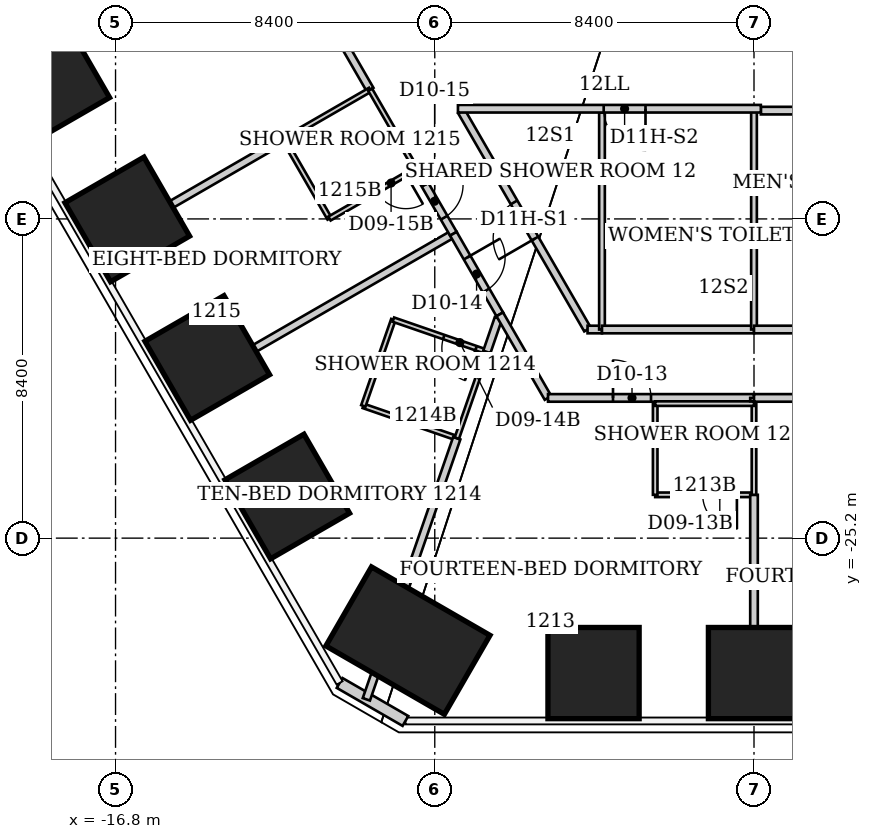
"""IFC4 building model, lengths in metres.
Left out: names, types, materials, properties, quantities, classifications, styles, units other than length and angle.
Written with IfcOpenShell. Run it as: python <this file> out.ifc"""

import sys

from ifc_helpers import new_model, si_unit, direction, frame, frame_2d, origin, origin_2d, place, context, subcontext, project, spatial, rectangle, extrude, clip, halfspace, element, fill, save


model = new_model("IFC4")
c1 = context("Model", 3, precision=1e-05, world=origin(), true_north=direction((0.0, 1.0)))
c2 = subcontext(c1, "Body", "Model", "MODEL_VIEW")
j1 = project(units=[si_unit("LENGTHUNIT", "METRE"), si_unit("PLANEANGLEUNIT", "RADIAN")], contexts=[c1])
p1 = place(None, origin())
s1 = spatial("IfcSite", under=j1, at=p1, CompositionType="ELEMENT")
p2 = place(p1, origin())
s2 = spatial("IfcBuilding", under=s1, at=p2, CompositionType="ELEMENT")
p3 = place(p2, frame((0.0, 0.0, 53.4)))
s3 = spatial("IfcBuildingStorey", under=s2, at=p3, CompositionType="ELEMENT", Elevation=53.4)
p4 = place(p3, frame((0.0, -28.751, 0.0), z_axis=(0.0, 0.0, 1.0), x_axis=(0.0, -1.0, 0.0)))
e1 = element("IfcColumn", 1, at=p4, inside=s3, PredefinedType="COLUMN", context=c2, shape_type="SweptSolid", body=[
    clip(extrude(rectangle(XDim=2.4, YDim=2.4, at=origin_2d()), origin(), (0.0, 0.0, 1.0), 3.745), halfspace(frame((0.0, 0.0, 3.64)), False)),
])
p5 = place(p3, frame((-4.222, -28.751, 0.0), z_axis=(0.0, 0.0, 1.0), x_axis=(0.0, -1.0, 0.0)))
e2 = element("IfcColumn", 2, at=p5, inside=s3, PredefinedType="COLUMN", context=c2, shape_type="SweptSolid", body=[
    clip(extrude(rectangle(XDim=2.4, YDim=2.4, at=origin_2d()), origin(), (0.0, 0.0, 1.0), 3.737), halfspace(frame((0.0, 0.0, 3.64)), False)),
])
p6 = place(p3, frame((-9.106, -27.897, 0.0), z_axis=(0.0, 0.0, 1.0), x_axis=(-0.5, -0.866025403784, 0.0)))
e3 = element("IfcColumn", 3, at=p6, inside=s3, PredefinedType="COLUMN", context=c2, shape_type="SweptSolid", body=[
    clip(extrude(rectangle(XDim=2.4, YDim=3.6, at=origin_2d()), origin(), (0.0, 0.0, 1.0), 3.726), halfspace(frame((0.0, 0.0, 3.64)), False)),
])
p7 = place(p3, frame((-12.282, -24.105, 0.0), z_axis=(0.0, 0.0, 1.0), x_axis=(-0.866025403784, -0.5, 0.0)))
e4 = element("IfcColumn", 4, at=p7, inside=s3, PredefinedType="COLUMN", context=c2, shape_type="SweptSolid", body=[
    clip(extrude(rectangle(XDim=2.4, YDim=2.4, at=origin_2d()), origin(), (0.0, 0.0, 1.0), 3.728), halfspace(frame((0.0, 0.0, 3.64)), False)),
])
p8 = place(p3, frame((-14.387, -20.459, 0.0), z_axis=(0.0, 0.0, 1.0), x_axis=(-0.866025403784, -0.5, 0.0)))
e5 = element("IfcColumn", 5, at=p8, inside=s3, PredefinedType="COLUMN", context=c2, shape_type="SweptSolid", body=[
    clip(extrude(rectangle(XDim=2.4, YDim=2.4, at=origin_2d()), origin(), (0.0, 0.0, 1.0), 3.736), halfspace(frame((0.0, 0.0, 3.64)), False)),
])
p9 = place(p3, frame((-16.491, -16.813, 0.0), z_axis=(0.0, 0.0, 1.0), x_axis=(-0.866025403784, -0.5, 0.0)))
e6 = element("IfcColumn", 6, at=p9, inside=s3, PredefinedType="COLUMN", context=c2, shape_type="SweptSolid", body=[
    clip(extrude(rectangle(XDim=2.4, YDim=2.4, at=origin_2d()), origin(), (0.0, 0.0, 1.0), 3.744), halfspace(frame((0.0, 0.0, 3.64)), False)),
])
p10 = place(p3, frame((-18.596, -13.167, 0.0), z_axis=(0.0, 0.0, 1.0), x_axis=(-0.866025403784, -0.5, 0.0)))
e7 = element("IfcColumn", 7, at=p10, inside=s3, PredefinedType="COLUMN", context=c2, shape_type="SweptSolid", body=[
    clip(extrude(rectangle(XDim=2.4, YDim=2.4, at=origin_2d()), origin(), (0.0, 0.0, 1.0), 3.752), halfspace(frame((0.0, 0.0, 3.64)), False)),
])
p11 = place(p3, frame((-9.172, -30.011, 0.0), z_axis=(0.0, 0.0, 1.0), x_axis=(-0.866010750942, 0.50002537861, 0.0)))
e8 = element("IfcWall", 8, at=p11, inside=s3, PredefinedType="SOLIDWALL", context=c2, shape_type="SweptSolid", body=[
    extrude(rectangle(XDim=2.0, YDim=0.3, at=frame_2d((1.0, 0.0))), origin(), (0.0, 0.0, 1.0), 3.64),
])
p12 = place(p3, frame((-17.356, -17.59, 0.0), z_axis=(0.0, 0.0, 1.0), x_axis=(0.865929957466, 0.500165281445, 0.0)))
e9 = element("IfcWall", 9, at=p12, inside=s3, PredefinedType="PARTITIONING", context=c2, shape_type="SweptSolid", body=[
    extrude(rectangle(XDim=5.758, YDim=0.2, at=frame_2d((2.879, 0.0))), origin(), (0.0, 0.0, 1.0), 3.64),
])
p13 = place(p3, frame((-15.176, -21.38, 0.0), z_axis=(0.0, 0.0, 1.0), x_axis=(0.866276837306, 0.49956425127, 0.0)))
e10 = element("IfcWall", 10, at=p13, inside=s3, PredefinedType="PARTITIONING", context=c2, shape_type="SweptSolid", body=[
    extrude(rectangle(XDim=8.373, YDim=0.2, at=frame_2d((4.186, 0.0))), origin(), (0.0, 0.0, 1.0), 3.64),
])
p14 = place(p3, frame((-13.25, -7.95, 0.0), z_axis=(0.0, 0.0, 1.0), x_axis=(0.500447534468, -0.865766865412, 0.0)))
e11 = element("IfcWall", 11, at=p14, inside=s3, PredefinedType="PARTITIONING", context=c2, shape_type="SweptSolid", body=[
    extrude(rectangle(XDim=6.295, YDim=0.2, at=frame_2d((3.147, 0.0))), origin(), (0.0, 0.0, 1.0), 3.64),
])
p15 = place(p14, frame((2.647, 0.0, 0.0)))
e12 = element("IfcOpeningElement", 12, at=p15, cuts=e11, PredefinedType="OPENING", context=c2, shape_type="SweptSolid", body=[
    extrude(rectangle(XDim=1.0, YDim=2.13, at=frame_2d((0.5, 1.065))), frame((0.0, 0.1, 0.0), z_axis=(0.0, -1.0, 0.0), x_axis=(1.0, 0.0, 0.0)), (0.0, 0.0, 1.0), 0.2),
])
p16 = place(p3, frame((-12.37, -14.71, 0.0), z_axis=(0.0, 0.0, 1.0), x_axis=(0.499769390944, -0.866158505053, 0.0)))
e13 = element("IfcWall", 13, at=p16, inside=s3, PredefinedType="PARTITIONING", context=c2, shape_type="SweptSolid", body=[
    extrude(rectangle(XDim=2.402, YDim=0.12, at=frame_2d((1.201, 0.0))), origin(), (0.0, 0.0, 1.0), 3.64),
])
p17 = place(p3, frame((-12.37, -14.71, 0.0), z_axis=(0.0, 0.0, 1.0), x_axis=(0.866114241029, 0.499846097802, 0.0)))
e14 = element("IfcWall", 14, at=p17, inside=s3, PredefinedType="PARTITIONING", context=c2, shape_type="SweptSolid", body=[
    extrude(rectangle(XDim=2.621, YDim=0.12, at=frame_2d((1.311, 0.0))), origin(), (0.0, 0.0, 1.0), 3.64),
])
p18 = place(p3, frame((-11.17, -16.79, 0.0), z_axis=(0.0, 0.0, 1.0), x_axis=(0.866114241029, 0.499846097802, 0.0)))
e15 = element("IfcWall", 15, at=p18, inside=s3, PredefinedType="PARTITIONING", context=c2, shape_type="SweptSolid", body=[
    extrude(rectangle(XDim=2.621, YDim=0.12, at=frame_2d((1.311, 0.0))), origin(), (0.0, 0.0, 1.0), 3.64),
])
p19 = place(p18, frame((1.421, 0.0, 0.0)))
e16 = element("IfcOpeningElement", 16, at=p19, cuts=e15, PredefinedType="OPENING", context=c2, shape_type="SweptSolid", body=[
    extrude(rectangle(XDim=0.9, YDim=2.03, at=frame_2d((0.45, 1.015))), frame((0.0, 0.06, 0.0), z_axis=(0.0, -1.0, 0.0), x_axis=(1.0, 0.0, 0.0)), (0.0, 0.0, 1.0), 0.12),
])
p20 = place(p3, frame((-10.28, -21.72, 0.0), z_axis=(0.0, 0.0, 1.0), x_axis=(0.94515546045, -0.326620813149, 0.0)))
e17 = element("IfcWall", 17, at=p20, inside=s3, PredefinedType="PARTITIONING", context=c2, shape_type="SweptSolid", body=[
    extrude(rectangle(XDim=2.603, YDim=0.12, at=frame_2d((1.301, 0.0))), origin(), (0.0, 0.0, 1.0), 3.64),
])
p21 = place(p3, frame((-10.2, -29.442, 0.0), z_axis=(0.0, 0.0, 1.0), x_axis=(0.327154379454, 0.944970905374, 0.0)))
e18 = element("IfcWall", 18, at=p21, inside=s3, PredefinedType="PARTITIONING", context=c2, shape_type="SweptSolid", body=[
    extrude(rectangle(XDim=7.272, YDim=0.2, at=frame_2d((3.636, 0.0))), origin(), (0.0, 0.0, 1.0), 3.64),
])
p22 = place(p3, frame((-10.1, -13.4, 0.0), z_axis=(0.0, 0.0, 1.0), x_axis=(0.499769390944, -0.866158505053, 0.0)))
e19 = element("IfcWall", 19, at=p22, inside=s3, PredefinedType="PARTITIONING", context=c2, shape_type="SweptSolid", body=[
    extrude(rectangle(XDim=2.402, YDim=0.12, at=frame_2d((1.201, 0.0))), origin(), (0.0, 0.0, 1.0), 3.64),
])
p23 = place(p3, frame((-9.49, -19.45, 0.0), z_axis=(0.0, 0.0, 1.0), x_axis=(-0.328693963496, -0.944436487203, 0.0)))
e20 = element("IfcWall", 20, at=p23, inside=s3, PredefinedType="PARTITIONING", context=c2, shape_type="SweptSolid", body=[
    extrude(rectangle(XDim=2.404, YDim=0.12, at=frame_2d((1.202, 0.0))), origin(), (0.0, 0.0, 1.0), 3.64),
])
p24 = place(p3, frame((-8.9, -15.48, 0.0), z_axis=(0.0, 0.0, 1.0), x_axis=(0.501041141208, -0.865423465603, 0.0)))
e21 = element("IfcWall", 21, at=p24, inside=s3, PredefinedType="PARTITIONING", context=c2, shape_type="SweptSolid", body=[
    extrude(rectangle(XDim=1.976, YDim=0.2, at=frame_2d((0.988, 0.0))), origin(), (0.0, 0.0, 1.0), 3.64),
])
p25 = place(p24, frame((0.488, 0.0, 0.0)))
e22 = element("IfcOpeningElement", 22, at=p25, cuts=e21, PredefinedType="OPENING", context=c2, shape_type="SweptSolid", body=[
    extrude(rectangle(XDim=1.0, YDim=2.13, at=frame_2d((0.5, 1.065))), frame((0.0, 0.1, 0.0), z_axis=(0.0, -1.0, 0.0), x_axis=(1.0, 0.0, 0.0)), (0.0, 0.0, 1.0), 0.2),
])
p26 = place(p3, frame((-7.91, -17.19, 0.0), z_axis=(0.0, 0.0, 1.0), x_axis=(0.498748634132, -0.866746675766, 0.0)))
e23 = element("IfcWall", 23, at=p26, inside=s3, PredefinedType="PARTITIONING", context=c2, shape_type="SweptSolid", body=[
    extrude(rectangle(XDim=2.446, YDim=0.2, at=frame_2d((1.223, 0.0))), origin(), (0.0, 0.0, 1.0), 3.64),
])
p27 = place(p26, frame((0.723, 0.0, 0.0)))
e24 = element("IfcOpeningElement", 24, at=p27, cuts=e23, PredefinedType="OPENING", context=c2, shape_type="SweptSolid", body=[
    extrude(rectangle(XDim=1.0, YDim=2.13, at=frame_2d((0.5, 1.065))), frame((0.0, 0.1, 0.0), z_axis=(0.0, -1.0, 0.0), x_axis=(1.0, 0.0, 0.0)), (0.0, 0.0, 1.0), 0.2),
])
p28 = place(p3, frame((-7.82, -22.57, 0.0), z_axis=(0.0, 0.0, 1.0), x_axis=(0.328693963496, 0.944436487203, 0.0)))
e25 = element("IfcWall", 25, at=p28, inside=s3, PredefinedType="PARTITIONING", context=c2, shape_type="SweptSolid", body=[
    extrude(rectangle(XDim=2.404, YDim=0.12, at=frame_2d((1.202, 0.0))), origin(), (0.0, 0.0, 1.0), 3.64),
])
p29 = place(p3, frame((-7.03, -20.3, 0.0), z_axis=(0.0, 0.0, 1.0), x_axis=(-0.94515546045, 0.326620813149, 0.0)))
e26 = element("IfcWall", 26, at=p29, inside=s3, PredefinedType="PARTITIONING", context=c2, shape_type="SweptSolid", body=[
    extrude(rectangle(XDim=2.603, YDim=0.12, at=frame_2d((1.301, 0.0))), origin(), (0.0, 0.0, 1.0), 3.64),
])
p30 = place(p29, frame((0.3, 0.0, 0.0)))
e27 = element("IfcOpeningElement", 27, at=p30, cuts=e26, PredefinedType="OPENING", context=c2, shape_type="SweptSolid", body=[
    extrude(rectangle(XDim=0.9, YDim=2.03, at=frame_2d((0.45, 1.015))), frame((0.0, 0.06, 0.0), z_axis=(0.0, -1.0, 0.0), x_axis=(1.0, 0.0, 0.0)), (0.0, 0.0, 1.0), 0.12),
])
p31 = place(p3, frame((-7.03, -20.3, 0.0), z_axis=(0.0, 0.0, 1.0), x_axis=(0.324737408014, 0.94580421644, 0.0)))
e28 = element("IfcWall", 28, at=p31, inside=s3, PredefinedType="PARTITIONING", context=c2, shape_type="SweptSolid", body=[
    extrude(rectangle(XDim=0.937, YDim=0.2, at=frame_2d((0.468, 0.0))), origin(), (0.0, 0.0, 1.0), 3.64),
])
p32 = place(p3, frame((-6.69, -19.31, 0.0), z_axis=(0.0, 0.0, 1.0), x_axis=(0.499963722229, -0.866046347752, 0.0)))
e29 = element("IfcWall", 29, at=p32, inside=s3, PredefinedType="PARTITIONING", context=c2, shape_type="SweptSolid", body=[
    extrude(rectangle(XDim=2.54, YDim=0.2, at=frame_2d((1.27, 0.0))), origin(), (0.0, 0.0, 1.0), 3.64),
])
p33 = place(p3, frame((-5.42, -21.51, 0.0), z_axis=(0.0, 0.0, 1.0), x_axis=(1.0, 0.0, 0.0)))
e30 = element("IfcWall", 30, at=p33, inside=s3, PredefinedType="PARTITIONING", context=c2, shape_type="SweptSolid", body=[
    extrude(rectangle(XDim=5.42, YDim=0.2, at=frame_2d((2.71, 0.0))), origin(), (0.0, 0.0, 1.0), 3.64),
])
p34 = place(p33, frame((1.71, 0.0, 0.0)))
e31 = element("IfcOpeningElement", 31, at=p34, cuts=e30, PredefinedType="OPENING", context=c2, shape_type="SweptSolid", body=[
    extrude(rectangle(XDim=1.0, YDim=2.13, at=frame_2d((0.5, 1.065))), frame((0.0, 0.1, 0.0), z_axis=(0.0, -1.0, 0.0), x_axis=(1.0, 0.0, 0.0)), (0.0, 0.0, 1.0), 0.2),
])
p35 = place(p3, frame((-4.38, -19.71, 0.0), z_axis=(0.0, 0.0, 1.0), x_axis=(-0.500523653757, 0.865722860984, 0.0)))
e32 = element("IfcWall", 32, at=p35, inside=s3, PredefinedType="PARTITIONING", context=c2, shape_type="SweptSolid", body=[
    extrude(rectangle(XDim=6.628, YDim=0.2, at=frame_2d((3.314, 0.0))), origin(), (0.0, 0.0, 1.0), 3.64),
])
p36 = place(p35, frame((2.764, 0.0, 0.0)))
e33 = element("IfcOpeningElement", 33, at=p36, cuts=e32, PredefinedType="OPENING", context=c2, shape_type="SweptSolid", body=[
    extrude(rectangle(XDim=1.1, YDim=2.2, at=frame_2d((0.55, 1.1))), frame((0.0, 0.1, 0.0), z_axis=(0.0, -1.0, 0.0), x_axis=(1.0, 0.0, 0.0)), (0.0, 0.0, 1.0), 0.2),
])
p37 = place(p3, frame((-4.0, -19.71, 0.0), z_axis=(0.0, 0.0, 1.0), x_axis=(-1.0, 0.0, 0.0)))
e34 = element("IfcWall", 34, at=p37, inside=s3, PredefinedType="PARTITIONING", context=c2, shape_type="SweptSolid", body=[
    extrude(rectangle(XDim=0.38, YDim=0.2, at=frame_2d((0.19, 0.0))), origin(), (0.0, 0.0, 1.0), 3.64),
])
p38 = place(p3, frame((-4.0, -14.0, 0.0), z_axis=(0.0, 0.0, 1.0), x_axis=(0.0, -1.0, 0.0)))
e35 = element("IfcWall", 35, at=p38, inside=s3, PredefinedType="PARTITIONING", context=c2, shape_type="SweptSolid", body=[
    extrude(rectangle(XDim=5.71, YDim=0.15, at=frame_2d((2.855, 0.0))), origin(), (0.0, 0.0, 1.0), 3.64),
])
p39 = place(p3, frame((-2.6, -24.06, 0.0), z_axis=(0.0, 0.0, 1.0), x_axis=(1.0, 0.0, 0.0)))
e36 = element("IfcWall", 36, at=p39, inside=s3, PredefinedType="PARTITIONING", context=c2, shape_type="SweptSolid", body=[
    extrude(rectangle(XDim=2.6, YDim=0.12, at=frame_2d((1.3, 0.0))), origin(), (0.0, 0.0, 1.0), 3.64),
])
p40 = place(p39, frame((1.25, 0.0, 0.0)))
e37 = element("IfcOpeningElement", 37, at=p40, cuts=e36, PredefinedType="OPENING", context=c2, shape_type="SweptSolid", body=[
    extrude(rectangle(XDim=0.9, YDim=2.03, at=frame_2d((0.45, 1.015))), frame((0.0, 0.06, 0.0), z_axis=(0.0, -1.0, 0.0), x_axis=(1.0, 0.0, 0.0)), (0.0, 0.0, 1.0), 0.12),
])
p41 = place(p3, frame((-2.6, -21.66, 0.0), z_axis=(0.0, 0.0, 1.0), x_axis=(0.0, -1.0, 0.0)))
e38 = element("IfcWall", 38, at=p41, inside=s3, PredefinedType="PARTITIONING", context=c2, shape_type="SweptSolid", body=[
    extrude(rectangle(XDim=2.4, YDim=0.12, at=frame_2d((1.2, 0.0))), origin(), (0.0, 0.0, 1.0), 3.64),
])
p42 = place(p3, frame((0.0, -29.89, 0.0), z_axis=(0.0, 0.0, 1.0), x_axis=(0.0, 1.0, 0.0)))
e39 = element("IfcWall", 39, at=p42, inside=s3, PredefinedType="PARTITIONING", context=c2, shape_type="SweptSolid", body=[
    extrude(rectangle(XDim=5.83, YDim=0.2, at=frame_2d((2.915, 0.0))), origin(), (0.0, 0.0, 1.0), 2.86),
])
p43 = place(p3, frame((0.0, -24.06, 0.0), z_axis=(0.0, 0.0, 1.0), x_axis=(0.0, 1.0, 0.0)))
e40 = element("IfcWall", 40, at=p43, inside=s3, PredefinedType="PARTITIONING", context=c2, shape_type="SweptSolid", body=[
    extrude(rectangle(XDim=2.4, YDim=0.12, at=frame_2d((1.2, 0.0))), origin(), (0.0, 0.0, 1.0), 2.86),
])
p44 = place(p3, frame((0.0, -21.66, 0.0), z_axis=(0.0, 0.0, 1.0), x_axis=(-1.0, 0.0, 0.0)))
e41 = element("IfcWall", 41, at=p44, inside=s3, PredefinedType="PARTITIONING", context=c2, shape_type="SweptSolid", body=[
    extrude(rectangle(XDim=2.6, YDim=0.12, at=frame_2d((1.3, 0.0))), origin(), (0.0, 0.0, 1.0), 3.64),
])
p45 = place(p3, frame((0.0, -21.6, 0.0), z_axis=(0.0, 0.0, 1.0), x_axis=(0.0, 1.0, 0.0)))
e42 = element("IfcWall", 42, at=p45, inside=s3, PredefinedType="PARTITIONING", context=c2, shape_type="SweptSolid", body=[
    extrude(rectangle(XDim=0.09, YDim=0.2, at=frame_2d((0.045, 0.0))), origin(), (0.0, 0.0, 1.0), 3.64),
])
p46 = place(p3, frame((0.0, -21.51, 0.0), z_axis=(0.0, 0.0, 1.0), x_axis=(1.0, 0.0, 0.0)))
e43 = element("IfcWall", 43, at=p46, inside=s3, PredefinedType="PARTITIONING", context=c2, shape_type="SweptSolid", body=[
    extrude(rectangle(XDim=5.42, YDim=0.2, at=frame_2d((2.71, 0.0))), origin(), (0.0, 0.0, 1.0), 3.64),
])
p47 = place(p46, frame((2.21, 0.0, 0.0)))
e44 = element("IfcOpeningElement", 44, at=p47, cuts=e43, PredefinedType="OPENING", context=c2, shape_type="SweptSolid", body=[
    extrude(rectangle(XDim=1.0, YDim=2.13, at=frame_2d((0.5, 1.065))), frame((0.0, 0.1, 0.0), z_axis=(0.0, -1.0, 0.0), x_axis=(1.0, 0.0, 0.0)), (0.0, 0.0, 1.0), 0.2),
])
p48 = place(p3, frame((0.0, -19.71, 0.0), z_axis=(0.0, 0.0, 1.0), x_axis=(-1.0, 0.0, 0.0)))
e45 = element("IfcWall", 45, at=p48, inside=s3, PredefinedType="PARTITIONING", context=c2, shape_type="SweptSolid", body=[
    extrude(rectangle(XDim=4.0, YDim=0.2, at=frame_2d((2.0, 0.0))), origin(), (0.0, 0.0, 1.0), 3.64),
])
p49 = place(p3, frame((0.0, -13.95, 0.0), z_axis=(0.0, 0.0, 1.0), x_axis=(0.0, -1.0, 0.0)))
e46 = element("IfcWall", 46, at=p49, inside=s3, PredefinedType="PARTITIONING", context=c2, shape_type="SweptSolid", body=[
    extrude(rectangle(XDim=5.76, YDim=0.15, at=frame_2d((2.88, 0.0))), origin(), (0.0, 0.0, 1.0), 2.86),
])
p50 = place(p3, frame((0.18, -13.95, 0.0), z_axis=(0.0, 0.0, 1.0), x_axis=(1.0, 0.0, 0.0)))
e47 = element("IfcWall", 47, at=p50, inside=s3, PredefinedType="PARTITIONING", context=c2, shape_type="SweptSolid", body=[
    extrude(rectangle(XDim=3.82, YDim=0.2, at=frame_2d((1.91, 0.0))), origin(), (0.0, 0.0, 1.0), 3.64),
])
p51 = place(p3, frame((0.18, -13.9, 0.0), z_axis=(0.0, 0.0, 1.0), x_axis=(-1.0, 0.0, 0.0)))
e48 = element("IfcWall", 48, at=p51, inside=s3, PredefinedType="PARTITIONING", context=c2, shape_type="SweptSolid", body=[
    extrude(rectangle(XDim=7.97, YDim=0.2, at=frame_2d((3.985, 0.0))), origin(), (0.0, 0.0, 1.0), 3.64),
])
p52 = place(p51, frame((3.035, 0.0, 0.0)))
e49 = element("IfcOpeningElement", 49, at=p52, cuts=e48, PredefinedType="OPENING", context=c2, shape_type="SweptSolid", body=[
    extrude(rectangle(XDim=1.1, YDim=2.2, at=frame_2d((0.55, 1.1))), frame((0.0, 0.1, 0.0), z_axis=(0.0, -1.0, 0.0), x_axis=(1.0, 0.0, 0.0)), (0.0, 0.0, 1.0), 0.2),
])
p53 = place(p3, frame((4.0, -19.71, 0.0), z_axis=(0.0, 0.0, 1.0), x_axis=(-1.0, 0.0, 0.0)))
e50 = element("IfcWall", 50, at=p53, inside=s3, PredefinedType="PARTITIONING", context=c2, shape_type="SweptSolid", body=[
    extrude(rectangle(XDim=4.0, YDim=0.2, at=frame_2d((2.0, 0.0))), origin(), (0.0, 0.0, 1.0), 3.64),
])
p54 = place(p53, frame((1.45, 0.0, 0.0)))
e51 = element("IfcOpeningElement", 51, at=p54, cuts=e50, PredefinedType="OPENING", context=c2, shape_type="SweptSolid", body=[
    extrude(rectangle(XDim=1.1, YDim=2.2, at=frame_2d((0.55, 1.1))), frame((0.0, 0.1, 0.0), z_axis=(0.0, -1.0, 0.0), x_axis=(1.0, 0.0, 0.0)), (0.0, 0.0, 1.0), 0.2),
])
p55 = place(p34, origin())
e52 = element("IfcDoor", 52, at=p55, inside=s3, OperationType="SINGLE_SWING_LEFT", PredefinedType="DOOR", context=c2, shape_type="SweptSolid", body=[
    extrude(rectangle(XDim=1.0, YDim=2.13, at=frame_2d((0.5, 1.065))), frame((0.0, 0.025, 0.0), z_axis=(0.0, -1.0, 0.0), x_axis=(1.0, 0.0, 0.0)), (0.0, 0.0, 1.0), 0.05),
])
fill(e31, e52)
p56 = place(p40, origin())
e53 = element("IfcDoor", 53, at=p56, inside=s3, OperationType="SINGLE_SWING_RIGHT", PredefinedType="DOOR", context=c2, shape_type="SweptSolid", body=[
    extrude(rectangle(XDim=0.9, YDim=2.03, at=frame_2d((0.45, 1.015))), frame((0.0, 0.025, 0.0), z_axis=(0.0, -1.0, 0.0), x_axis=(1.0, 0.0, 0.0)), (0.0, 0.0, 1.0), 0.05),
])
fill(e37, e53)
p57 = place(p27, origin())
e54 = element("IfcDoor", 54, at=p57, inside=s3, OperationType="SINGLE_SWING_LEFT", PredefinedType="DOOR", context=c2, shape_type="SweptSolid", body=[
    extrude(rectangle(XDim=1.0, YDim=2.13, at=frame_2d((0.5, 1.065))), frame((0.0, 0.025, 0.0), z_axis=(0.0, -1.0, 0.0), x_axis=(1.0, 0.0, 0.0)), (0.0, 0.0, 1.0), 0.05),
])
fill(e24, e54)
p58 = place(p30, origin())
e55 = element("IfcDoor", 55, at=p58, inside=s3, OperationType="SINGLE_SWING_LEFT", PredefinedType="DOOR", context=c2, shape_type="SweptSolid", body=[
    extrude(rectangle(XDim=0.9, YDim=2.03, at=frame_2d((0.45, 1.015))), frame((0.0, 0.025, 0.0), z_axis=(0.0, -1.0, 0.0), x_axis=(1.0, 0.0, 0.0)), (0.0, 0.0, 1.0), 0.05),
])
fill(e27, e55)
p59 = place(p25, origin())
e56 = element("IfcDoor", 56, at=p59, inside=s3, OperationType="SINGLE_SWING_LEFT", PredefinedType="DOOR", context=c2, shape_type="SweptSolid", body=[
    extrude(rectangle(XDim=1.0, YDim=2.13, at=frame_2d((0.5, 1.065))), frame((0.0, 0.025, 0.0), z_axis=(0.0, -1.0, 0.0), x_axis=(1.0, 0.0, 0.0)), (0.0, 0.0, 1.0), 0.05),
])
fill(e22, e56)
p60 = place(p19, origin())
e57 = element("IfcDoor", 57, at=p60, inside=s3, OperationType="SINGLE_SWING_RIGHT", PredefinedType="DOOR", context=c2, shape_type="SweptSolid", body=[
    extrude(rectangle(XDim=0.9, YDim=2.03, at=frame_2d((0.45, 1.015))), frame((0.0, 0.025, 0.0), z_axis=(0.0, -1.0, 0.0), x_axis=(1.0, 0.0, 0.0)), (0.0, 0.0, 1.0), 0.05),
])
fill(e16, e57)
p61 = place(p36, origin())
e58 = element("IfcDoor", 58, at=p61, inside=s3, OperationType="SINGLE_SWING_LEFT", PredefinedType="DOOR", context=c2, shape_type="SweptSolid", body=[
    extrude(rectangle(XDim=1.1, YDim=2.2, at=frame_2d((0.55, 1.1))), frame((0.0, 0.025, 0.0), z_axis=(0.0, -1.0, 0.0), x_axis=(1.0, 0.0, 0.0)), (0.0, 0.0, 1.0), 0.05),
])
fill(e33, e58)
p62 = place(p52, origin())
e59 = element("IfcDoor", 59, at=p62, inside=s3, OperationType="SINGLE_SWING_LEFT", PredefinedType="DOOR", context=c2, shape_type="SweptSolid", body=[
    extrude(rectangle(XDim=1.1, YDim=2.2, at=frame_2d((0.55, 1.1))), frame((0.0, 0.025, 0.0), z_axis=(0.0, -1.0, 0.0), x_axis=(1.0, 0.0, 0.0)), (0.0, 0.0, 1.0), 0.05),
])
fill(e49, e59)
save(model, sys.argv[1])
